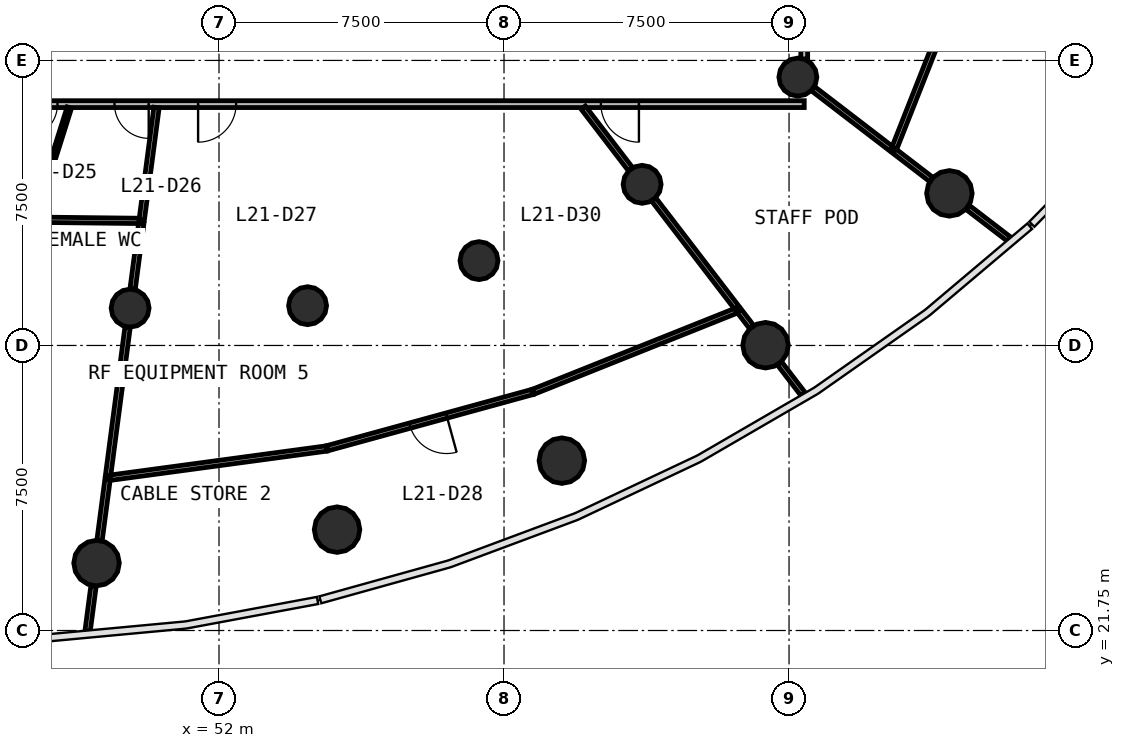
"""IFC4 building model, lengths in metres.
Left out: names, types, materials, properties, quantities, classifications, styles, units other than length and angle.
Written with IfcOpenShell. Run it as: python <this file> out.ifc"""

import sys

from ifc_helpers import new_model, si_unit, direction, frame, frame_2d, origin, origin_2d, place, context, subcontext, project, spatial, rectangle, circle, extrude, source, transform, mapped, element, fill, save


model = new_model("IFC4")
c1 = context("Model", 3, precision=1e-05, world=origin(), true_north=direction((0.0, 1.0)))
c2 = subcontext(c1, "Body", "Model", "MODEL_VIEW")
j1 = project(units=[si_unit("LENGTHUNIT", "METRE"), si_unit("PLANEANGLEUNIT", "RADIAN")], contexts=[c1])
p1 = place(None, origin())
s1 = spatial("IfcSite", under=j1, at=p1, CompositionType="ELEMENT")
p2 = place(p1, origin())
s2 = spatial("IfcBuilding", under=s1, at=p2, CompositionType="ELEMENT")
p3 = place(p2, frame((0.0, 0.0, 92.1)))
s3 = spatial("IfcBuildingStorey", under=s2, at=p3, CompositionType="ELEMENT", Elevation=92.1)
m1 = source(origin(), c2, "Body", "SweptSolid", [
    extrude(circle(Radius=0.6, at=origin_2d()), origin(), (0.0, 0.0, 1.0), 4.1),
])
for number, where, z_axis, x_axis in (
    (1, (48.778, 23.523, 0.0), (0.0, 0.0, 1.0), (1.0, 0.0, 0.0)),
    (2, (55.106, 24.405, 0.0), (0.0, 0.0, 1.0), (1.0, 0.0, 0.0)),
    (3, (61.022, 26.219, 0.0), (0.0, 0.0, 1.0), (1.0, 0.0, 0.0)),
    (4, (66.382, 29.257, 0.0), (0.0, 0.0, 1.0), (1.0, 0.0, 0.0)),
    (5, (71.22, 33.252, 0.0), (0.0, 0.0, 1.0), (1.0, 0.0, 0.0)),
):
    element("IfcColumn", number, at=place(p3, frame(where, z_axis=z_axis, x_axis=x_axis)), inside=s3, PredefinedType="COLUMN", context=c2, shape_type="MappedRepresentation", body=[
        mapped(m1, transform((0.0, 0.0, 0.0), scale=1.0)),
    ])
m2 = source(origin(), c2, "Body", "SweptSolid", [
    extrude(circle(Radius=0.5, at=origin_2d()), origin(), (0.0, 0.0, 1.0), 4.1),
])
for number, where, z_axis, x_axis in (
    (6, (49.661, 30.233, 0.0), (0.0, 0.0, 1.0), (1.0, 0.0, 0.0)),
    (7, (54.331, 30.297, 0.0), (0.0, 0.0, 1.0), (1.0, 0.0, 0.0)),
    (8, (58.842, 31.482, 0.0), (0.0, 0.0, 1.0), (1.0, 0.0, 0.0)),
    (9, (63.134, 33.49, 0.0), (0.0, 0.0, 1.0), (1.0, 0.0, 0.0)),
    (10, (67.232, 36.312, 0.0), (0.0, 0.0, 1.0), (1.0, 0.0, 0.0)),
):
    element("IfcColumn", number, at=place(p3, frame(where, z_axis=z_axis, x_axis=x_axis)), inside=s3, PredefinedType="COLUMN", context=c2, shape_type="MappedRepresentation", body=[
        mapped(m2, transform((0.0, 0.0, 0.0), scale=1.0)),
    ])
p4 = place(p3, frame((67.4, 35.6, 0.0), z_axis=(0.0, 0.0, 1.0), x_axis=(-1.0, 0.0, 0.0)))
e11 = element("IfcWall", 11, at=p4, inside=s3, PredefinedType="PARTITIONING", context=c2, shape_type="SweptSolid", body=[
    extrude(rectangle(XDim=30.8, YDim=0.18, at=frame_2d((15.4, 0.0))), origin(), (0.0, 0.0, 1.0), 2.9),
])
p5 = place(p4, frame((22.25, 0.0, 0.0)))
e12 = element("IfcOpeningElement", 12, at=p5, cuts=e11, PredefinedType="OPENING", context=c2, shape_type="SweptSolid", body=[
    extrude(rectangle(XDim=0.9, YDim=2.1, at=frame_2d((0.45, 1.05))), frame((0.0, 0.1, 0.0), z_axis=(0.0, -1.0, 0.0), x_axis=(1.0, 0.0, 0.0)), (0.0, 0.0, 1.0), 0.2),
])
p6 = place(p4, frame((19.65, 0.0, 0.0)))
e13 = element("IfcOpeningElement", 13, at=p6, cuts=e11, PredefinedType="OPENING", context=c2, shape_type="SweptSolid", body=[
    extrude(rectangle(XDim=0.9, YDim=2.1, at=frame_2d((0.45, 1.05))), frame((0.0, 0.1, 0.0), z_axis=(0.0, -1.0, 0.0), x_axis=(1.0, 0.0, 0.0)), (0.0, 0.0, 1.0), 0.2),
])
p7 = place(p4, frame((17.25, 0.0, 0.0)))
e14 = element("IfcOpeningElement", 14, at=p7, cuts=e11, PredefinedType="OPENING", context=c2, shape_type="SweptSolid", body=[
    extrude(rectangle(XDim=0.9, YDim=2.1, at=frame_2d((0.45, 1.05))), frame((0.0, 0.1, 0.0), z_axis=(0.0, -1.0, 0.0), x_axis=(1.0, 0.0, 0.0)), (0.0, 0.0, 1.0), 0.2),
])
p8 = place(p4, frame((14.95, 0.0, 0.0)))
e15 = element("IfcOpeningElement", 15, at=p8, cuts=e11, PredefinedType="OPENING", context=c2, shape_type="SweptSolid", body=[
    extrude(rectangle(XDim=1.0, YDim=2.1, at=frame_2d((0.5, 1.05))), frame((0.0, 0.1, 0.0), z_axis=(0.0, -1.0, 0.0), x_axis=(1.0, 0.0, 0.0)), (0.0, 0.0, 1.0), 0.2),
])
p9 = place(p4, frame((4.35, 0.0, 0.0)))
e16 = element("IfcOpeningElement", 16, at=p9, cuts=e11, PredefinedType="OPENING", context=c2, shape_type="SweptSolid", body=[
    extrude(rectangle(XDim=1.0, YDim=2.1, at=frame_2d((0.5, 1.05))), frame((0.0, 0.1, 0.0), z_axis=(0.0, -1.0, 0.0), x_axis=(1.0, 0.0, 0.0)), (0.0, 0.0, 1.0), 0.2),
])
p10 = place(p3, frame((67.4, 60.37, 0.0), z_axis=(0.0, 0.0, 1.0), x_axis=(0.0, -1.0, 0.0)))
e17 = element("IfcWall", 17, at=p10, inside=s3, PredefinedType="PARTITIONING", context=c2, shape_type="SweptSolid", body=[
    extrude(rectangle(XDim=23.583, YDim=0.18, at=frame_2d((11.791, 0.0))), origin(), (0.0, 0.0, 1.0), 2.9),
])
p11 = place(p10, frame((11.333, 0.0, 0.0)))
e18 = element("IfcOpeningElement", 18, at=p11, cuts=e17, PredefinedType="OPENING", context=c2, shape_type="SweptSolid", body=[
    extrude(rectangle(XDim=1.0, YDim=2.1, at=frame_2d((0.5, 1.05))), frame((0.0, 0.1, 0.0), z_axis=(0.0, -1.0, 0.0), x_axis=(1.0, 0.0, 0.0)), (0.0, 0.0, 1.0), 0.2),
])
p12 = place(p10, frame((9.133, 0.0, 0.0)))
e19 = element("IfcOpeningElement", 19, at=p12, cuts=e17, PredefinedType="OPENING", context=c2, shape_type="SweptSolid", body=[
    extrude(rectangle(XDim=1.0, YDim=2.1, at=frame_2d((0.5, 1.05))), frame((0.0, 0.1, 0.0), z_axis=(0.0, -1.0, 0.0), x_axis=(1.0, 0.0, 0.0)), (0.0, 0.0, 1.0), 0.2),
])
p13 = place(p3, frame((60.271, 28.032, 0.0), z_axis=(0.0, 0.0, 1.0), x_axis=(0.928604128406, 0.371071923902, 0.0)))
e20 = element("IfcWall", 20, at=p13, inside=s3, PredefinedType="PARTITIONING", context=c2, shape_type="SweptSolid", body=[
    extrude(rectangle(XDim=5.811, YDim=0.14, at=frame_2d((2.905, 0.0))), origin(), (0.0, 0.0, 1.0), 2.9),
])
p14 = place(p3, frame((49.072, 25.761, 0.0), z_axis=(0.0, 0.0, 1.0), x_axis=(0.991000573884, 0.133857620483, 0.0)))
e21 = element("IfcWall", 21, at=p14, inside=s3, PredefinedType="PARTITIONING", context=c2, shape_type="SweptSolid", body=[
    extrude(rectangle(XDim=5.805, YDim=0.14, at=frame_2d((2.903, 0.0))), origin(), (0.0, 0.0, 1.0), 2.9),
])
p15 = place(p3, frame((69.747, 34.382, 0.0), z_axis=(0.0, 0.0, 1.0), x_axis=(0.367316282509, 0.930096096435, 0.0)))
e22 = element("IfcWall", 22, at=p15, inside=s3, PredefinedType="PARTITIONING", context=c2, shape_type="SweptSolid", body=[
    extrude(rectangle(XDim=5.791, YDim=0.14, at=frame_2d((2.895, 0.0))), origin(), (0.0, 0.0, 1.0), 2.9),
])
p16 = place(p3, frame((60.242, 28.024, 0.0), z_axis=(0.0, 0.0, 1.0), x_axis=(-0.964366385499, -0.264570358355, 0.0)))
e23 = element("IfcWall", 23, at=p16, inside=s3, PredefinedType="PARTITIONING", context=c2, shape_type="SweptSolid", body=[
    extrude(rectangle(XDim=5.586, YDim=0.14, at=frame_2d((2.793, 0.0))), origin(), (0.0, 0.0, 1.0), 2.9),
])
p17 = place(p16, frame((2.337, 0.0, 0.0)))
e24 = element("IfcOpeningElement", 24, at=p17, cuts=e23, PredefinedType="OPENING", context=c2, shape_type="SweptSolid", body=[
    extrude(rectangle(XDim=1.0, YDim=2.1, at=frame_2d((0.5, 1.05))), frame((0.0, 0.08, 0.0), z_axis=(0.0, -1.0, 0.0), x_axis=(1.0, 0.0, 0.0)), (0.0, 0.0, 1.0), 0.16),
])
p18 = place(p3, frame((45.641, 32.576, 0.0), z_axis=(0.0, 0.0, 1.0), x_axis=(0.999935534921, -0.011354558642, 0.0)))
e25 = element("IfcWall", 25, at=p18, inside=s3, PredefinedType="PARTITIONING", context=c2, shape_type="SweptSolid", body=[
    extrude(rectangle(XDim=4.322, YDim=0.14, at=frame_2d((2.161, 0.0))), origin(), (0.0, 0.0, 1.0), 2.9),
])
p19 = place(p3, frame((49.595, 29.733, 0.0), z_axis=(0.0, 0.0, 1.0), x_axis=(-0.130480204278, -0.991450914716, 0.0)))
e26 = element("IfcWall", 26, at=p19, inside=s3, PredefinedType="PARTITIONING", context=c2, shape_type="SweptSolid", body=[
    extrude(rectangle(XDim=3.933, YDim=0.14, at=frame_2d((1.967, 0.0))), origin(), (0.0, 0.0, 1.0), 2.9),
])
p20 = place(p3, frame((63.441, 33.09, 0.0), z_axis=(0.0, 0.0, 1.0), x_axis=(0.608758966835, -0.793355229577, 0.0)))
e27 = element("IfcWall", 27, at=p20, inside=s3, PredefinedType="PARTITIONING", context=c2, shape_type="SweptSolid", body=[
    extrude(rectangle(XDim=3.584, YDim=0.14, at=frame_2d((1.792, 0.0))), origin(), (0.0, 0.0, 1.0), 2.9),
])
p21 = place(p3, frame((50.356, 35.51, 0.0), z_axis=(0.0, 0.0, 1.0), x_axis=(-0.13056900495, -0.991439224031, 0.0)))
e28 = element("IfcWall", 28, at=p21, inside=s3, PredefinedType="PARTITIONING", context=c2, shape_type="SweptSolid", body=[
    extrude(rectangle(XDim=2.979, YDim=0.14, at=frame_2d((1.489, 0.0))), origin(), (0.0, 0.0, 1.0), 2.9),
])
p22 = place(p3, frame((67.633, 36.005, 0.0), z_axis=(0.0, 0.0, 1.0), x_axis=(0.793386534399, -0.608718167164, 0.0)))
e29 = element("IfcWall", 29, at=p22, inside=s3, PredefinedType="PARTITIONING", context=c2, shape_type="SweptSolid", body=[
    extrude(rectangle(XDim=2.593, YDim=0.14, at=frame_2d((1.296, 0.0))), origin(), (0.0, 0.0, 1.0), 2.9),
])
p23 = place(p3, frame((61.584, 35.51, 0.0), z_axis=(0.0, 0.0, 1.0), x_axis=(0.608727763541, -0.793379171578, 0.0)))
e30 = element("IfcWall", 30, at=p23, inside=s3, PredefinedType="PARTITIONING", context=c2, shape_type="SweptSolid", body=[
    extrude(rectangle(XDim=2.042, YDim=0.14, at=frame_2d((1.021, 0.0))), origin(), (0.0, 0.0, 1.0), 2.9),
])
p24 = place(p3, frame((49.954, 32.457, 0.0), z_axis=(0.0, 0.0, 1.0), x_axis=(-0.130545289911, -0.991442346928, 0.0)))
e31 = element("IfcWall", 31, at=p24, inside=s3, PredefinedType="PARTITIONING", context=c2, shape_type="SweptSolid", body=[
    extrude(rectangle(XDim=1.739, YDim=0.14, at=frame_2d((0.87, 0.0))), origin(), (0.0, 0.0, 1.0), 2.9),
])
p25 = place(p3, frame((49.068, 25.732, 0.0), z_axis=(0.0, 0.0, 1.0), x_axis=(-0.13054788539, -0.991442005172, 0.0)))
e32 = element("IfcWall", 32, at=p25, inside=s3, PredefinedType="PARTITIONING", context=c2, shape_type="SweptSolid", body=[
    extrude(rectangle(XDim=1.623, YDim=0.14, at=frame_2d((0.812, 0.0))), origin(), (0.0, 0.0, 1.0), 2.9),
])
p26 = place(p3, frame((71.699, 32.884, 0.0), z_axis=(0.0, 0.0, 1.0), x_axis=(0.793327210849, -0.608795480047, 0.0)))
e33 = element("IfcWall", 33, at=p26, inside=s3, PredefinedType="PARTITIONING", context=c2, shape_type="SweptSolid", body=[
    extrude(rectangle(XDim=1.38, YDim=0.14, at=frame_2d((0.69, 0.0))), origin(), (0.0, 0.0, 1.0), 2.9),
])
p27 = place(p3, frame((69.771, 34.364, 0.0), z_axis=(0.0, 0.0, 1.0), x_axis=(0.793284637014, -0.608850954403, 0.0)))
e34 = element("IfcWall", 34, at=p27, inside=s3, PredefinedType="PARTITIONING", context=c2, shape_type="SweptSolid", body=[
    extrude(rectangle(XDim=1.222, YDim=0.14, at=frame_2d((0.611, 0.0))), origin(), (0.0, 0.0, 1.0), 2.9),
])
p28 = place(p3, frame((48.699, 22.924, 0.0), z_axis=(0.0, 0.0, 1.0), x_axis=(-0.130475508699, -0.991451532668, 0.0)))
e35 = element("IfcWall", 35, at=p28, inside=s3, PredefinedType="PARTITIONING", context=c2, shape_type="SweptSolid", body=[
    extrude(rectangle(XDim=1.203, YDim=0.14, at=frame_2d((0.602, 0.0))), origin(), (0.0, 0.0, 1.0), 2.9),
])
p29 = place(p3, frame((66.75, 28.778, 0.0), z_axis=(0.0, 0.0, 1.0), x_axis=(0.608699102478, -0.793401161231, 0.0)))
e36 = element("IfcWall", 36, at=p29, inside=s3, PredefinedType="PARTITIONING", context=c2, shape_type="SweptSolid", body=[
    extrude(rectangle(XDim=1.015, YDim=0.14, at=frame_2d((0.508, 0.0))), origin(), (0.0, 0.0, 1.0), 2.9),
])
p30 = place(p3, frame((65.685, 30.165, 0.0), z_axis=(0.0, 0.0, 1.0), x_axis=(0.609076851589, -0.79311120838, 0.0)))
e37 = element("IfcWall", 37, at=p30, inside=s3, PredefinedType="PARTITIONING", context=c2, shape_type="SweptSolid", body=[
    extrude(rectangle(XDim=0.54, YDim=0.14, at=frame_2d((0.27, 0.0))), origin(), (0.0, 0.0, 1.0), 2.9),
])
p31 = place(p3, frame((48.062, 35.51, 0.0), z_axis=(0.0, 0.0, 1.0), x_axis=(-0.30071748679, -0.953713265683, 0.0)))
e38 = element("IfcWall", 38, at=p31, inside=s3, PredefinedType="PARTITIONING", context=c2, shape_type="SweptSolid", body=[
    extrude(rectangle(XDim=3.021, YDim=0.12, at=frame_2d((1.51, 0.0))), origin(), (0.0, 0.0, 1.0), 2.9),
])
m3 = source(origin(), c2, "Body", "SweptSolid", [
    extrude(rectangle(XDim=0.9, YDim=2.1, at=frame_2d((0.45, 1.05))), frame((0.0, 0.025, 0.0), z_axis=(0.0, -1.0, 0.0), x_axis=(1.0, 0.0, 0.0)), (0.0, 0.0, 1.0), 0.05),
])
p32 = place(p6, origin())
e39 = element("IfcDoor", 39, at=p32, inside=s3, OperationType="SINGLE_SWING_RIGHT", PredefinedType="DOOR", context=c2, shape_type="MappedRepresentation", body=[
    mapped(m3, transform((0.0, 0.0, 0.0), scale=1.0)),
])
fill(e13, e39)
p33 = place(p7, origin())
e40 = element("IfcDoor", 40, at=p33, inside=s3, OperationType="SINGLE_SWING_LEFT", PredefinedType="DOOR", context=c2, shape_type="MappedRepresentation", body=[
    mapped(m3, transform((0.0, 0.0, 0.0), scale=1.0)),
])
fill(e14, e40)
m4 = source(origin(), c2, "Body", "SweptSolid", [
    extrude(rectangle(XDim=1.0, YDim=2.1, at=frame_2d((0.5, 1.05))), frame((0.0, 0.025, 0.0), z_axis=(0.0, -1.0, 0.0), x_axis=(1.0, 0.0, 0.0)), (0.0, 0.0, 1.0), 0.05),
])
p34 = place(p8, origin())
e41 = element("IfcDoor", 41, at=p34, inside=s3, OperationType="SINGLE_SWING_RIGHT", PredefinedType="DOOR", context=c2, shape_type="MappedRepresentation", body=[
    mapped(m4, transform((0.0, 0.0, 0.0), scale=1.0)),
])
fill(e15, e41)
p35 = place(p17, origin())
e42 = element("IfcDoor", 42, at=p35, inside=s3, OperationType="SINGLE_SWING_LEFT", PredefinedType="DOOR", context=c2, shape_type="MappedRepresentation", body=[
    mapped(m4, transform((0.0, 0.0, 0.0), scale=1.0)),
])
fill(e24, e42)
p36 = place(p9, origin())
e43 = element("IfcDoor", 43, at=p36, inside=s3, OperationType="SINGLE_SWING_LEFT", PredefinedType="DOOR", context=c2, shape_type="MappedRepresentation", body=[
    mapped(m4, transform((0.0, 0.0, 0.0), scale=1.0)),
])
fill(e16, e43)
save(model, sys.argv[1])
